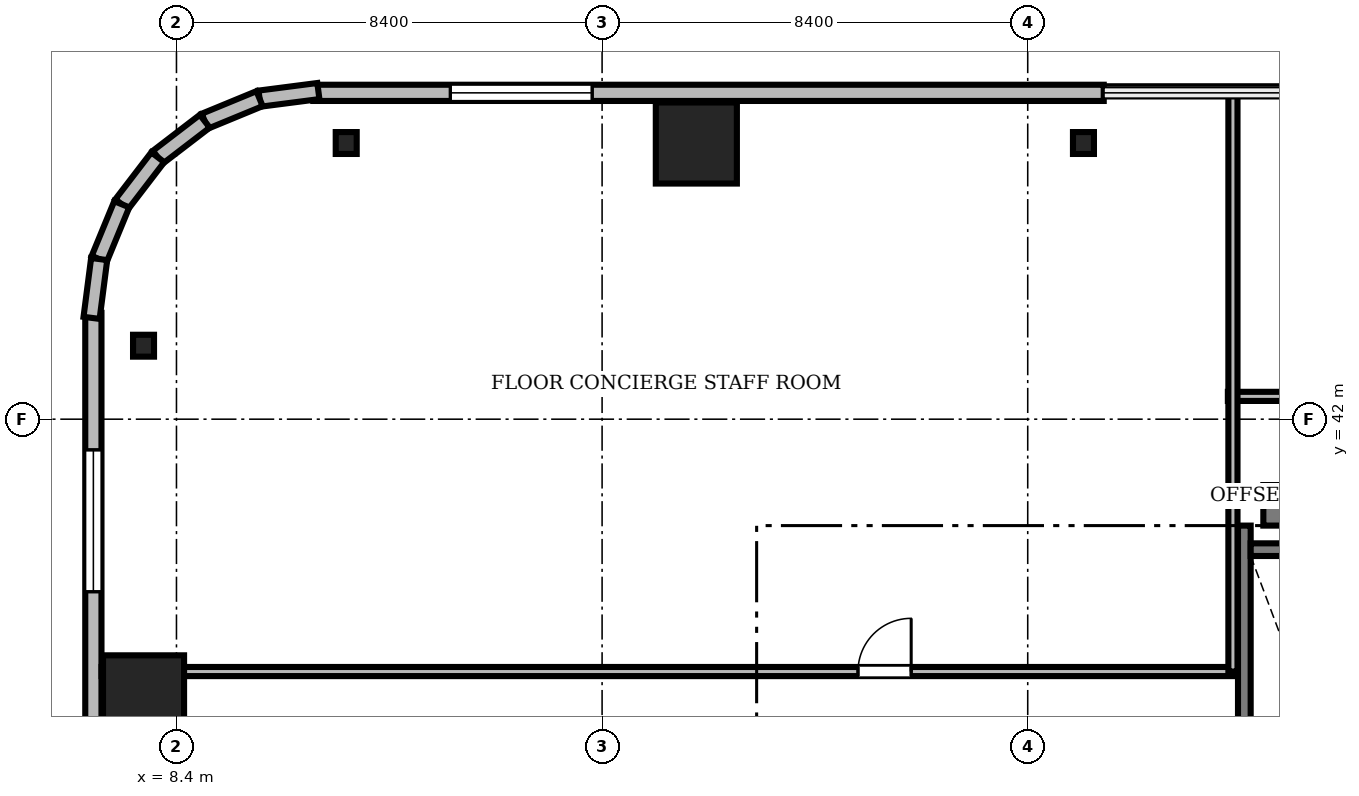
"""IFC4 building model, lengths in metres.
Left out: names, types, materials, properties, quantities, classifications, styles, units other than length and angle.
Written with IfcOpenShell. Run it as: python <this file> out.ifc"""

import sys

from ifc_helpers import new_model, si_unit, direction, frame, frame_2d, origin, origin_2d, place, context, subcontext, project, spatial, rectangle, i_section, extrude, source, transform, mapped, element, fill, save


model = new_model("IFC4")
c1 = context("Model", 3, precision=1e-05, world=origin(), true_north=direction((0.0, 1.0)))
c2 = subcontext(c1, "Body", "Model", "MODEL_VIEW")
j1 = project(units=[si_unit("LENGTHUNIT", "METRE"), si_unit("PLANEANGLEUNIT", "RADIAN")], contexts=[c1])
p1 = place(None, origin())
s1 = spatial("IfcSite", under=j1, at=p1, CompositionType="ELEMENT")
p2 = place(p1, origin())
s2 = spatial("IfcBuilding", under=s1, at=p2, CompositionType="ELEMENT")
p3 = place(p2, frame((0.0, 0.0, 163.1)))
s3 = spatial("IfcBuildingStorey", under=s2, at=p3, CompositionType="ELEMENT", Elevation=163.1)
m1 = source(origin(), c2, "Body", "SweptSolid", [
    extrude(rectangle(XDim=17.52, YDim=0.8, at=frame_2d((8.76, 0.0))), origin(), (0.0, 0.0, 1.0), 3.05),
])
p4 = place(p3, frame((29.85, 40.3, 0.0), z_axis=(0.0, 0.0, 1.0), x_axis=(1.0, 0.0, 0.0)))
e1 = element("IfcWall", 1, at=p4, inside=s3, PredefinedType="SHEAR", context=c2, shape_type="MappedRepresentation", body=[
    mapped(m1, transform((0.0, 0.0, 0.0), scale=1.0)),
])
m2 = source(origin(), c2, "Body", "SweptSolid", [
    extrude(rectangle(XDim=1.6, YDim=1.6, at=origin_2d()), origin(), (0.0, 0.0, 1.0), 3.05),
])
for number, where, z_axis, x_axis in (
    (2, (18.66, 47.45, 0.0), (0.0, 0.0, 1.0), (1.0, 0.0, 0.0)),
    (3, (7.75, 36.54, 0.0), (0.0, 0.0, 1.0), (1.0, 0.0, 0.0)),
):
    element("IfcColumn", number, at=place(p3, frame(where, z_axis=z_axis, x_axis=x_axis)), inside=s3, PredefinedType="COLUMN", context=c2, shape_type="MappedRepresentation", body=[
        mapped(m2, transform((0.0, 0.0, 0.0), scale=1.0)),
    ])
m3 = source(origin(), c2, "Body", "SweptSolid", [
    extrude(i_section(OverallWidth=0.414, OverallDepth=0.432, WebThickness=0.026, FlangeThickness=0.04, FilletRadius=0.015, at=origin_2d()), origin(), (0.0, 0.0, 1.0), 3.05),
])
for number, where, z_axis, x_axis in (
    (4, (26.3, 47.45, 0.0), (0.0, 0.0, 1.0), (1.0, 0.0, 0.0)),
    (5, (11.75, 47.45, 0.0), (0.0, 0.0, 1.0), (1.0, 0.0, 0.0)),
    (6, (7.75, 43.45, 0.0), (0.0, 0.0, 1.0), (1.0, 0.0, 0.0)),
):
    element("IfcColumn", number, at=place(p3, frame(where, z_axis=z_axis, x_axis=x_axis)), inside=s3, PredefinedType="COLUMN", context=c2, shape_type="MappedRepresentation", body=[
        mapped(m3, transform((0.0, 0.0, 0.0), scale=1.0)),
    ])
m4 = source(origin(), c2, "Body", "SweptSolid", [
    extrude(rectangle(XDim=15.6, YDim=0.32, at=frame_2d((7.8, 0.0))), origin(), (0.0, 0.0, 1.0), 3.05),
])
p5 = place(p3, frame((26.7, 48.44, 0.0), z_axis=(0.0, 0.0, 1.0), x_axis=(-1.0, 0.0, 0.0)))
e7 = element("IfcWall", 7, at=p5, inside=s3, PredefinedType="SOLIDWALL", context=c2, shape_type="MappedRepresentation", body=[
    mapped(m4, transform((0.0, 0.0, 0.0), scale=1.0)),
])
m5 = source(origin(), c2, "Body", "SweptSolid", [
    extrude(rectangle(XDim=2.8, YDim=2.4, at=frame_2d((1.4, 1.2))), frame((0.0, 0.17, 0.0), z_axis=(0.0, -1.0, 0.0), x_axis=(1.0, 0.0, 0.0)), (0.0, 0.0, 1.0), 0.34),
])
p6 = place(p5, frame((10.095, 0.0, 0.39)))
e8 = element("IfcOpeningElement", 8, at=p6, cuts=e7, PredefinedType="OPENING", context=c2, shape_type="MappedRepresentation", body=[
    mapped(m5, transform((0.0, 0.0, 0.0), scale=1.0)),
])
m6 = source(origin(), c2, "Body", "SweptSolid", [
    extrude(rectangle(XDim=15.6, YDim=0.32, at=frame_2d((7.8, 0.0))), origin(), (0.0, 0.0, 1.0), 3.05),
])
p7 = place(p3, frame((6.76, 44.1, 0.0), z_axis=(0.0, 0.0, 1.0), x_axis=(0.0, -1.0, 0.0)))
e9 = element("IfcWall", 9, at=p7, inside=s3, PredefinedType="SOLIDWALL", context=c2, shape_type="MappedRepresentation", body=[
    mapped(m6, transform((0.0, 0.0, 0.0), scale=1.0)),
])
m7 = source(origin(), c2, "Body", "SweptSolid", [
    extrude(rectangle(XDim=1.4, YDim=2.3, at=frame_2d((0.7, 1.15))), frame((0.0, 0.17, 0.0), z_axis=(0.0, -1.0, 0.0), x_axis=(1.0, 0.0, 0.0)), (0.0, 0.0, 1.0), 0.34),
])
p8 = place(p7, frame((9.61, 0.0, 0.0)))
e10 = element("IfcOpeningElement", 10, at=p8, cuts=e9, PredefinedType="OPENING", context=c2, shape_type="MappedRepresentation", body=[
    mapped(m7, transform((0.0, 0.0, 0.0), scale=1.0)),
])
p9 = place(p7, frame((2.705, 0.0, 0.39)))
e11 = element("IfcOpeningElement", 11, at=p9, cuts=e9, PredefinedType="OPENING", context=c2, shape_type="MappedRepresentation", body=[
    mapped(m5, transform((0.0, 0.0, 0.0), scale=1.0)),
])
m8 = source(origin(), c2, "Body", "SweptSolid", [
    extrude(rectangle(XDim=1.17, YDim=0.32, at=frame_2d((0.585, 0.0))), origin(), (0.0, 0.0, 1.0), 3.05),
])
p10 = place(p3, frame((11.2, 48.476, 0.0), z_axis=(0.0, 0.0, 1.0), x_axis=(-0.991735963317, -0.128295670475, 0.0)))
e12 = element("IfcWall", 12, at=p10, inside=s3, PredefinedType="SOLIDWALL", context=c2, shape_type="MappedRepresentation", body=[
    mapped(m8, transform((0.0, 0.0, 0.0), scale=1.0)),
])
m9 = source(origin(), c2, "Body", "SweptSolid", [
    extrude(rectangle(XDim=1.169, YDim=0.32, at=frame_2d((0.584, 0.0))), origin(), (0.0, 0.0, 1.0), 3.05),
])
p11 = place(p3, frame((10.04, 48.325, 0.0), z_axis=(0.0, 0.0, 1.0), x_axis=(-0.924552646638, -0.381054331552, 0.0)))
e13 = element("IfcWall", 13, at=p11, inside=s3, PredefinedType="SOLIDWALL", context=c2, shape_type="MappedRepresentation", body=[
    mapped(m9, transform((0.0, 0.0, 0.0), scale=1.0)),
])
m10 = source(origin(), c2, "Body", "SweptSolid", [
    extrude(rectangle(XDim=1.169, YDim=0.32, at=frame_2d((0.584, 0.0))), origin(), (0.0, 0.0, 1.0), 3.05),
])
p12 = place(p3, frame((8.959, 47.88, 0.0), z_axis=(0.0, 0.0, 1.0), x_axis=(-0.793663520347, -0.608356981114, 0.0)))
e14 = element("IfcWall", 14, at=p12, inside=s3, PredefinedType="SOLIDWALL", context=c2, shape_type="MappedRepresentation", body=[
    mapped(m10, transform((0.0, 0.0, 0.0), scale=1.0)),
])
m11 = source(origin(), c2, "Body", "SweptSolid", [
    extrude(rectangle(XDim=1.169, YDim=0.32, at=frame_2d((0.584, 0.0))), origin(), (0.0, 0.0, 1.0), 3.05),
])
p13 = place(p3, frame((8.031, 47.169, 0.0), z_axis=(0.0, 0.0, 1.0), x_axis=(-0.608387696831, -0.793639975269, 0.0)))
e15 = element("IfcWall", 15, at=p13, inside=s3, PredefinedType="SOLIDWALL", context=c2, shape_type="MappedRepresentation", body=[
    mapped(m11, transform((0.0, 0.0, 0.0), scale=1.0)),
])
p14 = place(p3, frame((7.32, 46.241, 0.0), z_axis=(0.0, 0.0, 1.0), x_axis=(-0.381054331552, -0.924552646638, 0.0)))
e16 = element("IfcWall", 16, at=p14, inside=s3, PredefinedType="SOLIDWALL", context=c2, shape_type="MappedRepresentation", body=[
    mapped(m9, transform((0.0, 0.0, 0.0), scale=1.0)),
])
p15 = place(p3, frame((6.875, 45.16, 0.0), z_axis=(0.0, 0.0, 1.0), x_axis=(-0.128295670475, -0.991735963317, 0.0)))
e17 = element("IfcWall", 17, at=p15, inside=s3, PredefinedType="SOLIDWALL", context=c2, shape_type="MappedRepresentation", body=[
    mapped(m8, transform((0.0, 0.0, 0.0), scale=1.0)),
])
m12 = source(origin(), c2, "Body", "SweptSolid", [
    extrude(rectangle(XDim=9.25, YDim=0.25, at=frame_2d((4.625, 0.0))), origin(), (0.0, 0.0, 1.0), 3.5),
])
p16 = place(p3, frame((29.475, 30.65, 0.0), z_axis=(0.0, 0.0, 1.0), x_axis=(0.0, 1.0, 0.0)))
e18 = element("IfcWall", 18, at=p16, inside=s3, PredefinedType="SOLIDWALL", context=c2, shape_type="MappedRepresentation", body=[
    mapped(m12, transform((0.0, 0.0, 0.0), scale=1.0)),
])
m13 = source(origin(), c2, "Body", "SweptSolid", [
    extrude(rectangle(XDim=3.15, YDim=0.25, at=frame_2d((1.575, 0.0))), origin(), (0.0, 0.0, 1.0), 3.5),
])
p17 = place(p3, frame((29.6, 39.425, 0.0), z_axis=(0.0, 0.0, 1.0), x_axis=(1.0, 0.0, 0.0)))
e19 = element("IfcWall", 19, at=p17, inside=s3, PredefinedType="SOLIDWALL", context=c2, shape_type="MappedRepresentation", body=[
    mapped(m13, transform((0.0, 0.0, 0.0), scale=1.0)),
])
m14 = source(origin(), c2, "Body", "SweptSolid", [
    extrude(rectangle(XDim=23.928, YDim=0.18, at=frame_2d((11.964, 0.0))), origin(), (0.0, 0.0, 1.0), 2.326),
])
p18 = place(p3, frame((29.15, 42.45, 0.0), z_axis=(0.0, 0.0, 1.0), x_axis=(1.0, 0.0, 0.0)))
e20 = element("IfcWall", 20, at=p18, inside=s3, PredefinedType="PARTITIONING", context=c2, shape_type="MappedRepresentation", body=[
    mapped(m14, transform((0.0, 0.0, 0.0), scale=1.0)),
])
m15 = source(origin(), c2, "Body", "SweptSolid", [
    extrude(rectangle(XDim=1.05, YDim=2.2, at=frame_2d((0.525, 1.1))), frame((0.0, 0.1, 0.0), z_axis=(0.0, -1.0, 0.0), x_axis=(1.0, 0.0, 0.0)), (0.0, 0.0, 1.0), 0.2),
])
p19 = place(p18, frame((4.5, 0.0, 0.0)))
e21 = element("IfcOpeningElement", 21, at=p19, cuts=e20, PredefinedType="OPENING", context=c2, shape_type="MappedRepresentation", body=[
    mapped(m15, transform((0.0, 0.0, 0.0), scale=1.0)),
])
m16 = source(origin(), c2, "Body", "SweptSolid", [
    extrude(rectangle(XDim=22.328, YDim=0.18, at=frame_2d((11.164, 0.0))), origin(), (0.0, 0.0, 1.0), 2.326),
])
p20 = place(p3, frame((6.922, 37.02, 0.0), z_axis=(0.0, 0.0, 1.0), x_axis=(1.0, 0.0, 0.0)))
e22 = element("IfcWall", 22, at=p20, inside=s3, PredefinedType="PARTITIONING", context=c2, shape_type="MappedRepresentation", body=[
    mapped(m16, transform((0.0, 0.0, 0.0), scale=1.0)),
])
p21 = place(p20, frame((14.928, 0.0, 0.0)))
e23 = element("IfcOpeningElement", 23, at=p21, cuts=e22, PredefinedType="OPENING", context=c2, shape_type="MappedRepresentation", body=[
    mapped(m15, transform((0.0, 0.0, 0.0), scale=1.0)),
])
m17 = source(origin(), c2, "Body", "SweptSolid", [
    extrude(rectangle(XDim=11.45, YDim=0.18, at=frame_2d((5.725, 0.0))), origin(), (0.0, 0.0, 1.0), 2.326),
])
p22 = place(p3, frame((29.25, 37.02, 0.0), z_axis=(0.0, 0.0, 1.0), x_axis=(0.0, 1.0, 0.0)))
e24 = element("IfcWall", 24, at=p22, inside=s3, PredefinedType="PARTITIONING", context=c2, shape_type="MappedRepresentation", body=[
    mapped(m17, transform((0.0, 0.0, 0.0), scale=1.0)),
])
m18 = source(origin(), c2, "Body", "SweptSolid", [
    extrude(rectangle(XDim=2.8, YDim=2.4, at=frame_2d((1.4, 1.2))), frame((0.0, 0.03, 0.0), z_axis=(0.0, -1.0, 0.0), x_axis=(1.0, 0.0, 0.0)), (0.0, 0.0, 1.0), 0.06),
])
p23 = place(p6, origin())
e25 = element("IfcWindow", 25, at=p23, inside=s3, PartitioningType="SINGLE_PANEL", PredefinedType="WINDOW", context=c2, shape_type="MappedRepresentation", body=[
    mapped(m18, transform((0.0, 0.0, 0.0), scale=1.0)),
])
fill(e8, e25)
p24 = place(p9, origin())
e26 = element("IfcWindow", 26, at=p24, inside=s3, PartitioningType="SINGLE_PANEL", PredefinedType="WINDOW", context=c2, shape_type="MappedRepresentation", body=[
    mapped(m18, transform((0.0, 0.0, 0.0), scale=1.0)),
])
fill(e11, e26)
m19 = source(origin(), c2, "Body", "SweptSolid", [
    extrude(rectangle(XDim=1.05, YDim=2.2, at=frame_2d((0.525, 1.1))), frame((0.0, 0.025, 0.0), z_axis=(0.0, -1.0, 0.0), x_axis=(1.0, 0.0, 0.0)), (0.0, 0.0, 1.0), 0.05),
])
p25 = place(p21, origin())
e27 = element("IfcDoor", 27, at=p25, inside=s3, OperationType="SINGLE_SWING_RIGHT", PredefinedType="DOOR", context=c2, shape_type="MappedRepresentation", body=[
    mapped(m19, transform((0.0, 0.0, 0.0), scale=1.0)),
])
fill(e23, e27)
save(model, sys.argv[1])
